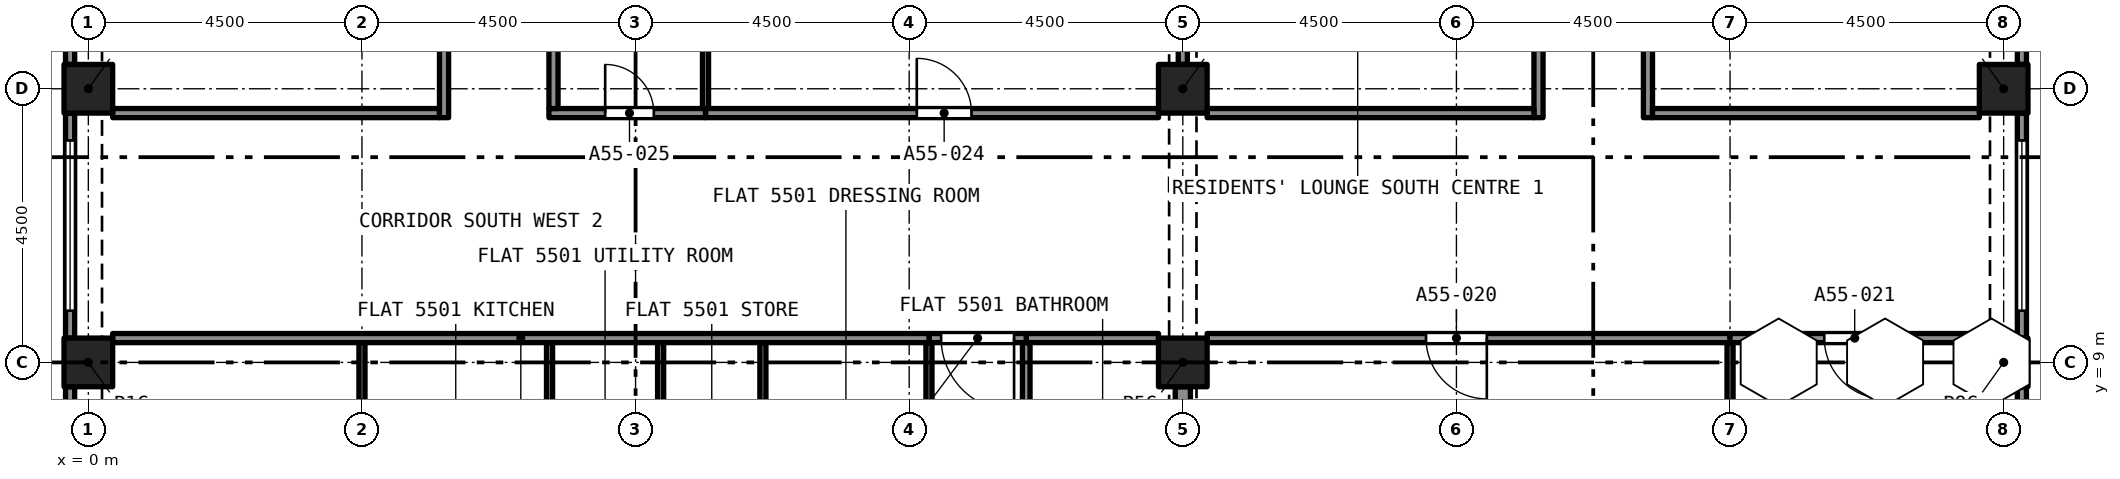
"""IFC4 building model, lengths in metres.
Left out: names, types, materials, properties, quantities, classifications, styles, units other than length and angle.
Written with IfcOpenShell. Run it as: python <this file> out.ifc"""

import sys

from ifc_helpers import new_model, si_unit, direction, frame, frame_2d, origin, origin_2d, place, context, subcontext, project, spatial, rectangle, extrude, element, fill, save


model = new_model("IFC4")
c1 = context("Model", 3, precision=1e-05, world=origin(), true_north=direction((0.0, 1.0)))
c2 = subcontext(c1, "Body", "Model", "MODEL_VIEW")
j1 = project(units=[si_unit("LENGTHUNIT", "METRE"), si_unit("PLANEANGLEUNIT", "RADIAN")], contexts=[c1])
p1 = place(None, origin())
s1 = spatial("IfcSite", under=j1, at=p1, CompositionType="ELEMENT")
p2 = place(p1, origin())
s2 = spatial("IfcBuilding", under=s1, at=p2, CompositionType="ELEMENT")
p3 = place(p2, frame((0.0, 0.0, 198.7)))
s3 = spatial("IfcBuildingStorey", under=s2, at=p3, CompositionType="ELEMENT", Elevation=198.7)
for number, where, z_axis, x_axis in (
    (1, (0.0, 9.0, 0.0), (0.0, 0.0, 1.0), (1.0, 0.0, 0.0)),
    (2, (18.0, 9.0, 0.0), (0.0, 0.0, 1.0), (1.0, 0.0, 0.0)),
    (3, (31.5, 9.0, 0.0), (0.0, 0.0, 1.0), (1.0, 0.0, 0.0)),
    (4, (0.0, 13.5, 0.0), (0.0, 0.0, 1.0), (1.0, 0.0, 0.0)),
    (5, (18.0, 13.5, 0.0), (0.0, 0.0, 1.0), (1.0, 0.0, 0.0)),
    (6, (31.5, 13.5, 0.0), (0.0, 0.0, 1.0), (1.0, 0.0, 0.0)),
):
    element("IfcColumn", number, at=place(p3, frame(where, z_axis=z_axis, x_axis=x_axis)), inside=s3, PredefinedType="COLUMN", context=c2, shape_type="SweptSolid", body=[
        extrude(rectangle(XDim=0.8, YDim=0.8, at=origin_2d()), origin(), (0.0, 0.0, 1.0), 3.2),
    ])
p4 = place(p3, frame((31.8, 8.6, 0.0), z_axis=(0.0, 0.0, 1.0), x_axis=(0.0, -1.0, 0.0)))
e7 = element("IfcWall", 7, at=p4, inside=s3, PredefinedType="SOLIDWALL", context=c2, shape_type="SweptSolid", body=[
    extrude(rectangle(XDim=3.7, YDim=0.15, at=frame_2d((1.85, 0.0))), origin(), (0.0, 0.0, 1.0), 3.2),
])
p5 = place(p4, frame((0.45, 0.0, 0.45)))
e8 = element("IfcOpeningElement", 8, at=p5, cuts=e7, PredefinedType="OPENING", context=c2, shape_type="SweptSolid", body=[
    extrude(rectangle(XDim=2.8, YDim=1.95, at=frame_2d((1.4, 0.975))), frame((0.0, 0.085, 0.0), z_axis=(0.0, -1.0, 0.0), x_axis=(1.0, 0.0, 0.0)), (0.0, 0.0, 1.0), 0.17),
])
p6 = place(p3, frame((31.8, 13.1, 0.0), z_axis=(0.0, 0.0, 1.0), x_axis=(0.0, -1.0, 0.0)))
e9 = element("IfcWall", 9, at=p6, inside=s3, PredefinedType="SOLIDWALL", context=c2, shape_type="SweptSolid", body=[
    extrude(rectangle(XDim=3.7, YDim=0.15, at=frame_2d((1.85, 0.0))), origin(), (0.0, 0.0, 1.0), 3.2),
])
p7 = place(p6, frame((0.45, 0.0, 0.45)))
e10 = element("IfcOpeningElement", 10, at=p7, cuts=e9, PredefinedType="OPENING", context=c2, shape_type="SweptSolid", body=[
    extrude(rectangle(XDim=2.8, YDim=1.95, at=frame_2d((1.4, 0.975))), frame((0.0, 0.085, 0.0), z_axis=(0.0, -1.0, 0.0), x_axis=(1.0, 0.0, 0.0)), (0.0, 0.0, 1.0), 0.17),
])
p8 = place(p3, frame((31.8, 17.6, 0.0), z_axis=(0.0, 0.0, 1.0), x_axis=(0.0, -1.0, 0.0)))
e11 = element("IfcWall", 11, at=p8, inside=s3, PredefinedType="SOLIDWALL", context=c2, shape_type="SweptSolid", body=[
    extrude(rectangle(XDim=3.7, YDim=0.15, at=frame_2d((1.85, 0.0))), origin(), (0.0, 0.0, 1.0), 3.2),
])
p9 = place(p8, frame((0.45, 0.0, 0.45)))
e12 = element("IfcOpeningElement", 12, at=p9, cuts=e11, PredefinedType="OPENING", context=c2, shape_type="SweptSolid", body=[
    extrude(rectangle(XDim=2.8, YDim=1.95, at=frame_2d((1.4, 0.975))), frame((0.0, 0.085, 0.0), z_axis=(0.0, -1.0, 0.0), x_axis=(1.0, 0.0, 0.0)), (0.0, 0.0, 1.0), 0.17),
])
p10 = place(p3, frame((-0.3, 13.9, 0.0), z_axis=(0.0, 0.0, 1.0), x_axis=(0.0, 1.0, 0.0)))
e13 = element("IfcWall", 13, at=p10, inside=s3, PredefinedType="SOLIDWALL", context=c2, shape_type="SweptSolid", body=[
    extrude(rectangle(XDim=3.7, YDim=0.15, at=frame_2d((1.85, 0.0))), origin(), (0.0, 0.0, 1.0), 3.2),
])
p11 = place(p10, frame((0.45, 0.0, 0.45)))
e14 = element("IfcOpeningElement", 14, at=p11, cuts=e13, PredefinedType="OPENING", context=c2, shape_type="SweptSolid", body=[
    extrude(rectangle(XDim=2.8, YDim=1.95, at=frame_2d((1.4, 0.975))), frame((0.0, 0.085, 0.0), z_axis=(0.0, -1.0, 0.0), x_axis=(1.0, 0.0, 0.0)), (0.0, 0.0, 1.0), 0.17),
])
p12 = place(p3, frame((-0.3, 9.4, 0.0), z_axis=(0.0, 0.0, 1.0), x_axis=(0.0, 1.0, 0.0)))
e15 = element("IfcWall", 15, at=p12, inside=s3, PredefinedType="SOLIDWALL", context=c2, shape_type="SweptSolid", body=[
    extrude(rectangle(XDim=3.7, YDim=0.15, at=frame_2d((1.85, 0.0))), origin(), (0.0, 0.0, 1.0), 3.2),
])
p13 = place(p12, frame((0.45, 0.0, 0.45)))
e16 = element("IfcOpeningElement", 16, at=p13, cuts=e15, PredefinedType="OPENING", context=c2, shape_type="SweptSolid", body=[
    extrude(rectangle(XDim=2.8, YDim=1.95, at=frame_2d((1.4, 0.975))), frame((0.0, 0.085, 0.0), z_axis=(0.0, -1.0, 0.0), x_axis=(1.0, 0.0, 0.0)), (0.0, 0.0, 1.0), 0.17),
])
p14 = place(p3, frame((-0.3, 4.9, 0.0), z_axis=(0.0, 0.0, 1.0), x_axis=(0.0, 1.0, 0.0)))
e17 = element("IfcWall", 17, at=p14, inside=s3, PredefinedType="SOLIDWALL", context=c2, shape_type="SweptSolid", body=[
    extrude(rectangle(XDim=3.7, YDim=0.15, at=frame_2d((1.85, 0.0))), origin(), (0.0, 0.0, 1.0), 3.2),
])
p15 = place(p14, frame((0.45, 0.0, 0.45)))
e18 = element("IfcOpeningElement", 18, at=p15, cuts=e17, PredefinedType="OPENING", context=c2, shape_type="SweptSolid", body=[
    extrude(rectangle(XDim=2.8, YDim=1.95, at=frame_2d((1.4, 0.975))), frame((0.0, 0.085, 0.0), z_axis=(0.0, -1.0, 0.0), x_axis=(1.0, 0.0, 0.0)), (0.0, 0.0, 1.0), 0.17),
])
p16 = place(p3, frame((15.425, 5.643, 0.0), z_axis=(0.0, 0.0, 1.0), x_axis=(0.0, 1.0, 0.0)))
e19 = element("IfcWall", 19, at=p16, inside=s3, PredefinedType="PARTITIONING", context=c2, shape_type="SweptSolid", body=[
    extrude(rectangle(XDim=3.682, YDim=0.125, at=frame_2d((1.841, 0.0))), origin(), (0.0, 0.0, 1.0), 2.7),
])
p17 = place(p3, frame((15.425, 9.4, 0.0), z_axis=(0.0, 0.0, 1.0), x_axis=(1.0, 0.0, 0.0)))
e20 = element("IfcWall", 20, at=p17, inside=s3, PredefinedType="PARTITIONING", context=c2, shape_type="SweptSolid", body=[
    extrude(rectangle(XDim=2.175, YDim=0.15, at=frame_2d((1.087, 0.0))), origin(), (0.0, 0.0, 1.0), 2.7),
])
for number, where, z_axis, x_axis in (
    (21, (13.825, 5.63, 0.0), (0.0, 0.0, 1.0), (0.0, 1.0, 0.0)),
    (22, (11.094, 5.63, 0.0), (0.0, 0.0, 1.0), (0.0, 1.0, 0.0)),
):
    element("IfcWall", number, at=place(p3, frame(where, z_axis=z_axis, x_axis=x_axis)), inside=s3, PredefinedType="PARTITIONING", context=c2, shape_type="SweptSolid", body=[
        extrude(rectangle(XDim=3.695, YDim=0.1, at=frame_2d((1.848, 0.0))), origin(), (0.0, 0.0, 1.0), 2.7),
    ])
p18 = place(p3, frame((18.0, 4.9, 0.0), z_axis=(0.0, 0.0, 1.0), x_axis=(0.0, 1.0, 0.0)))
e23 = element("IfcWall", 23, at=p18, inside=s3, PredefinedType="PARTITIONING", context=c2, shape_type="SweptSolid", body=[
    extrude(rectangle(XDim=3.7, YDim=0.25, at=frame_2d((1.85, 0.0))), origin(), (0.0, 0.0, 1.0), 2.38),
])
p19 = place(p3, frame((15.425, 9.4, 0.0), z_axis=(0.0, 0.0, 1.0), x_axis=(-1.0, 0.0, 0.0)))
e24 = element("IfcWall", 24, at=p19, inside=s3, PredefinedType="PARTITIONING", context=c2, shape_type="SweptSolid", body=[
    extrude(rectangle(XDim=1.6, YDim=0.15, at=frame_2d((0.8, 0.0))), origin(), (0.0, 0.0, 1.0), 2.7),
])
p20 = place(p19, frame((0.2, 0.0, 0.0)))
e25 = element("IfcOpeningElement", 25, at=p20, cuts=e24, PredefinedType="OPENING", context=c2, shape_type="SweptSolid", body=[
    extrude(rectangle(XDim=1.2, YDim=2.4, at=frame_2d((0.6, 1.2))), frame((0.0, 0.085, 0.0), z_axis=(0.0, -1.0, 0.0), x_axis=(1.0, 0.0, 0.0)), (0.0, 0.0, 1.0), 0.17),
])
p21 = place(p3, frame((4.5, 5.58, 0.0), z_axis=(0.0, 0.0, 1.0), x_axis=(0.0, 1.0, 0.0)))
e26 = element("IfcWall", 26, at=p21, inside=s3, PredefinedType="PARTITIONING", context=c2, shape_type="SweptSolid", body=[
    extrude(rectangle(XDim=3.745, YDim=0.1, at=frame_2d((1.873, 0.0))), origin(), (0.0, 0.0, 1.0), 2.7),
])
p22 = place(p3, frame((7.585, 5.63, 0.0), z_axis=(0.0, 0.0, 1.0), x_axis=(0.0, 1.0, 0.0)))
e27 = element("IfcWall", 27, at=p22, inside=s3, PredefinedType="PARTITIONING", context=c2, shape_type="SweptSolid", body=[
    extrude(rectangle(XDim=3.695, YDim=0.1, at=frame_2d((1.848, 0.0))), origin(), (0.0, 0.0, 1.0), 2.7),
])
p23 = place(p3, frame((0.4, 9.4, 0.0), z_axis=(0.0, 0.0, 1.0), x_axis=(1.0, 0.0, 0.0)))
e28 = element("IfcWall", 28, at=p23, inside=s3, PredefinedType="PARTITIONING", context=c2, shape_type="SweptSolid", body=[
    extrude(rectangle(XDim=13.425, YDim=0.15, at=frame_2d((6.712, 0.0))), origin(), (0.0, 0.0, 1.0), 2.7),
])
p24 = place(p3, frame((9.412, 5.63, 0.0), z_axis=(0.0, 0.0, 1.0), x_axis=(0.0, 1.0, 0.0)))
e29 = element("IfcWall", 29, at=p24, inside=s3, PredefinedType="PARTITIONING", context=c2, shape_type="SweptSolid", body=[
    extrude(rectangle(XDim=3.695, YDim=0.1, at=frame_2d((1.848, 0.0))), origin(), (0.0, 0.0, 1.0), 2.7),
])
p25 = place(p3, frame((27.0, 0.433, 0.0), z_axis=(0.0, 0.0, 1.0), x_axis=(0.0, 1.0, 0.0)))
e30 = element("IfcWall", 30, at=p25, inside=s3, PredefinedType="PARTITIONING", context=c2, shape_type="SweptSolid", body=[
    extrude(rectangle(XDim=8.892, YDim=0.1, at=frame_2d((4.446, 0.0))), origin(), (0.0, 0.0, 1.0), 2.7),
])
p26 = place(p3, frame((27.0, 9.4, 0.0), z_axis=(0.0, 0.0, 1.0), x_axis=(-1.0, 0.0, 0.0)))
e31 = element("IfcWall", 31, at=p26, inside=s3, PredefinedType="PARTITIONING", context=c2, shape_type="SweptSolid", body=[
    extrude(rectangle(XDim=8.6, YDim=0.15, at=frame_2d((4.3, 0.0))), origin(), (0.0, 0.0, 1.0), 2.7),
])
p27 = place(p26, frame((4.0, 0.0, 0.0)))
e32 = element("IfcOpeningElement", 32, at=p27, cuts=e31, PredefinedType="OPENING", context=c2, shape_type="SweptSolid", body=[
    extrude(rectangle(XDim=1.0, YDim=2.1, at=frame_2d((0.5, 1.05))), frame((0.0, 0.085, 0.0), z_axis=(0.0, -1.0, 0.0), x_axis=(1.0, 0.0, 0.0)), (0.0, 0.0, 1.0), 0.17),
])
p28 = place(p3, frame((31.1, 9.4, 0.0), z_axis=(0.0, 0.0, 1.0), x_axis=(-1.0, 0.0, 0.0)))
e33 = element("IfcWall", 33, at=p28, inside=s3, PredefinedType="PARTITIONING", context=c2, shape_type="SweptSolid", body=[
    extrude(rectangle(XDim=4.1, YDim=0.15, at=frame_2d((2.05, 0.0))), origin(), (0.0, 0.0, 1.0), 2.7),
])
p29 = place(p28, frame((1.55, 0.0, 0.0)))
e34 = element("IfcOpeningElement", 34, at=p29, cuts=e33, PredefinedType="OPENING", context=c2, shape_type="SweptSolid", body=[
    extrude(rectangle(XDim=1.0, YDim=2.1, at=frame_2d((0.5, 1.05))), frame((0.0, 0.085, 0.0), z_axis=(0.0, -1.0, 0.0), x_axis=(1.0, 0.0, 0.0)), (0.0, 0.0, 1.0), 0.17),
])
p30 = place(p3, frame((23.85, 13.025, 0.0), z_axis=(0.0, 0.0, 1.0), x_axis=(0.0, 1.0, 0.0)))
e35 = element("IfcWall", 35, at=p30, inside=s3, PredefinedType="PARTITIONING", context=c2, shape_type="SweptSolid", body=[
    extrude(rectangle(XDim=9.55, YDim=0.15, at=frame_2d((4.775, 0.0))), origin(), (0.0, 0.0, 1.0), 2.7),
])
p31 = place(p30, frame((4.275, 0.0, 0.0)))
e36 = element("IfcOpeningElement", 36, at=p31, cuts=e35, PredefinedType="OPENING", context=c2, shape_type="SweptSolid", body=[
    extrude(rectangle(XDim=1.0, YDim=2.1, at=frame_2d((0.5, 1.05))), frame((0.0, 0.085, 0.0), z_axis=(0.0, -1.0, 0.0), x_axis=(1.0, 0.0, 0.0)), (0.0, 0.0, 1.0), 0.17),
])
p32 = place(p3, frame((25.65, 22.575, 0.0), z_axis=(0.0, 0.0, 1.0), x_axis=(0.0, -1.0, 0.0)))
e37 = element("IfcWall", 37, at=p32, inside=s3, PredefinedType="PARTITIONING", context=c2, shape_type="SweptSolid", body=[
    extrude(rectangle(XDim=9.55, YDim=0.15, at=frame_2d((4.775, 0.0))), origin(), (0.0, 0.0, 1.0), 2.7),
])
p33 = place(p32, frame((4.275, 0.0, 0.0)))
e38 = element("IfcOpeningElement", 38, at=p33, cuts=e37, PredefinedType="OPENING", context=c2, shape_type="SweptSolid", body=[
    extrude(rectangle(XDim=1.0, YDim=2.1, at=frame_2d((0.5, 1.05))), frame((0.0, 0.085, 0.0), z_axis=(0.0, -1.0, 0.0), x_axis=(1.0, 0.0, 0.0)), (0.0, 0.0, 1.0), 0.17),
])
for number, where, z_axis, x_axis in (
    (39, (18.4, 13.1, 0.0), (0.0, 0.0, 1.0), (1.0, 0.0, 0.0)),
    (40, (25.725, 13.1, 0.0), (0.0, 0.0, 1.0), (1.0, 0.0, 0.0)),
):
    element("IfcWall", number, at=place(p3, frame(where, z_axis=z_axis, x_axis=x_axis)), inside=s3, PredefinedType="PARTITIONING", context=c2, shape_type="SweptSolid", body=[
        extrude(rectangle(XDim=5.375, YDim=0.15, at=frame_2d((2.688, 0.0))), origin(), (0.0, 0.0, 1.0), 2.7),
    ])
p34 = place(p3, frame((10.15, 13.1, 0.0), z_axis=(0.0, 0.0, 1.0), x_axis=(1.0, 0.0, 0.0)))
e41 = element("IfcWall", 41, at=p34, inside=s3, PredefinedType="PARTITIONING", context=c2, shape_type="SweptSolid", body=[
    extrude(rectangle(XDim=7.45, YDim=0.15, at=frame_2d((3.725, 0.0))), origin(), (0.0, 0.0, 1.0), 2.7),
])
p35 = place(p34, frame((3.475, 0.0, 0.0)))
e42 = element("IfcOpeningElement", 42, at=p35, cuts=e41, PredefinedType="OPENING", context=c2, shape_type="SweptSolid", body=[
    extrude(rectangle(XDim=0.9, YDim=2.1, at=frame_2d((0.45, 1.05))), frame((0.0, 0.085, 0.0), z_axis=(0.0, -1.0, 0.0), x_axis=(1.0, 0.0, 0.0)), (0.0, 0.0, 1.0), 0.17),
])
p36 = place(p3, frame((7.575, 13.1, 0.0), z_axis=(0.0, 0.0, 1.0), x_axis=(1.0, 0.0, 0.0)))
e43 = element("IfcWall", 43, at=p36, inside=s3, PredefinedType="PARTITIONING", context=c2, shape_type="SweptSolid", body=[
    extrude(rectangle(XDim=2.575, YDim=0.15, at=frame_2d((1.288, 0.0))), origin(), (0.0, 0.0, 1.0), 2.7),
])
p37 = place(p36, frame((0.925, 0.0, 0.0)))
e44 = element("IfcOpeningElement", 44, at=p37, cuts=e43, PredefinedType="OPENING", context=c2, shape_type="SweptSolid", body=[
    extrude(rectangle(XDim=0.8, YDim=2.1, at=frame_2d((0.4, 1.05))), frame((0.0, 0.085, 0.0), z_axis=(0.0, -1.0, 0.0), x_axis=(1.0, 0.0, 0.0)), (0.0, 0.0, 1.0), 0.17),
])
p38 = place(p3, frame((0.4, 13.1, 0.0), z_axis=(0.0, 0.0, 1.0), x_axis=(1.0, 0.0, 0.0)))
e45 = element("IfcWall", 45, at=p38, inside=s3, PredefinedType="PARTITIONING", context=c2, shape_type="SweptSolid", body=[
    extrude(rectangle(XDim=5.375, YDim=0.15, at=frame_2d((2.688, 0.0))), origin(), (0.0, 0.0, 1.0), 2.7),
])
p39 = place(p3, frame((18.0, 13.9, 0.0), z_axis=(0.0, 0.0, 1.0), x_axis=(0.0, 1.0, 0.0)))
e46 = element("IfcWall", 46, at=p39, inside=s3, PredefinedType="PARTITIONING", context=c2, shape_type="SweptSolid", body=[
    extrude(rectangle(XDim=1.8, YDim=0.15, at=frame_2d((0.9, 0.0))), origin(), (0.0, 0.0, 1.0), 2.38),
])
p40 = place(p3, frame((7.65, 13.175, 0.0), z_axis=(0.0, 0.0, 1.0), x_axis=(0.0, 1.0, 0.0)))
e47 = element("IfcWall", 47, at=p40, inside=s3, PredefinedType="PARTITIONING", context=c2, shape_type="SweptSolid", body=[
    extrude(rectangle(XDim=2.525, YDim=0.15, at=frame_2d((1.262, 0.0))), origin(), (0.0, 0.0, 1.0), 2.7),
])
p41 = place(p3, frame((5.85, 13.025, 0.0), z_axis=(0.0, 0.0, 1.0), x_axis=(0.0, 1.0, 0.0)))
e48 = element("IfcWall", 48, at=p41, inside=s3, PredefinedType="PARTITIONING", context=c2, shape_type="SweptSolid", body=[
    extrude(rectangle(XDim=9.475, YDim=0.15, at=frame_2d((4.738, 0.0))), origin(), (0.0, 0.0, 1.0), 2.7),
])
p42 = place(p41, frame((4.275, 0.0, 0.0)))
e49 = element("IfcOpeningElement", 49, at=p42, cuts=e48, PredefinedType="OPENING", context=c2, shape_type="SweptSolid", body=[
    extrude(rectangle(XDim=1.0, YDim=2.1, at=frame_2d((0.5, 1.05))), frame((0.0, 0.085, 0.0), z_axis=(0.0, -1.0, 0.0), x_axis=(1.0, 0.0, 0.0)), (0.0, 0.0, 1.0), 0.17),
])
p43 = place(p3, frame((10.15, 13.175, 0.0), z_axis=(0.0, 0.0, 1.0), x_axis=(0.0, 1.0, 0.0)))
e50 = element("IfcWall", 50, at=p43, inside=s3, PredefinedType="PARTITIONING", context=c2, shape_type="SweptSolid", body=[
    extrude(rectangle(XDim=2.45, YDim=0.1, at=frame_2d((1.225, 0.0))), origin(), (0.0, 0.0, 1.0), 2.7),
])
p44 = place(p7, origin())
e51 = element("IfcWindow", 51, at=p44, inside=s3, PartitioningType="SINGLE_PANEL", PredefinedType="WINDOW", context=c2, shape_type="SweptSolid", body=[
    extrude(rectangle(XDim=2.8, YDim=1.95, at=frame_2d((1.4, 0.975))), frame((0.0, 0.03, 0.0), z_axis=(0.0, -1.0, 0.0), x_axis=(1.0, 0.0, 0.0)), (0.0, 0.0, 1.0), 0.06),
])
fill(e10, e51)
p45 = place(p13, origin())
e52 = element("IfcWindow", 52, at=p45, inside=s3, PartitioningType="SINGLE_PANEL", PredefinedType="WINDOW", context=c2, shape_type="SweptSolid", body=[
    extrude(rectangle(XDim=2.8, YDim=1.95, at=frame_2d((1.4, 0.975))), frame((0.0, 0.03, 0.0), z_axis=(0.0, -1.0, 0.0), x_axis=(1.0, 0.0, 0.0)), (0.0, 0.0, 1.0), 0.06),
])
fill(e16, e52)
p46 = place(p20, origin())
e53 = element("IfcDoor", 53, at=p46, inside=s3, OperationType="SINGLE_SWING_LEFT", PredefinedType="DOOR", context=c2, shape_type="SweptSolid", body=[
    extrude(rectangle(XDim=1.2, YDim=2.4, at=frame_2d((0.6, 1.2))), frame((0.0, 0.025, 0.0), z_axis=(0.0, -1.0, 0.0), x_axis=(1.0, 0.0, 0.0)), (0.0, 0.0, 1.0), 0.05),
])
fill(e25, e53)
p47 = place(p27, origin())
e54 = element("IfcDoor", 54, at=p47, inside=s3, OperationType="SINGLE_SWING_RIGHT", PredefinedType="DOOR", context=c2, shape_type="SweptSolid", body=[
    extrude(rectangle(XDim=1.0, YDim=2.1, at=frame_2d((0.5, 1.05))), frame((0.0, 0.025, 0.0), z_axis=(0.0, -1.0, 0.0), x_axis=(1.0, 0.0, 0.0)), (0.0, 0.0, 1.0), 0.05),
])
fill(e32, e54)
p48 = place(p29, origin())
e55 = element("IfcDoor", 55, at=p48, inside=s3, OperationType="SINGLE_SWING_RIGHT", PredefinedType="DOOR", context=c2, shape_type="SweptSolid", body=[
    extrude(rectangle(XDim=1.0, YDim=2.1, at=frame_2d((0.5, 1.05))), frame((0.0, 0.025, 0.0), z_axis=(0.0, -1.0, 0.0), x_axis=(1.0, 0.0, 0.0)), (0.0, 0.0, 1.0), 0.05),
])
fill(e34, e55)
p49 = place(p35, origin())
e56 = element("IfcDoor", 56, at=p49, inside=s3, OperationType="SINGLE_SWING_RIGHT", PredefinedType="DOOR", context=c2, shape_type="SweptSolid", body=[
    extrude(rectangle(XDim=0.9, YDim=2.1, at=frame_2d((0.45, 1.05))), frame((0.0, 0.025, 0.0), z_axis=(0.0, -1.0, 0.0), x_axis=(1.0, 0.0, 0.0)), (0.0, 0.0, 1.0), 0.05),
])
fill(e42, e56)
p50 = place(p37, origin())
e57 = element("IfcDoor", 57, at=p50, inside=s3, OperationType="SINGLE_SWING_RIGHT", PredefinedType="DOOR", context=c2, shape_type="SweptSolid", body=[
    extrude(rectangle(XDim=0.8, YDim=2.1, at=frame_2d((0.4, 1.05))), frame((0.0, 0.025, 0.0), z_axis=(0.0, -1.0, 0.0), x_axis=(1.0, 0.0, 0.0)), (0.0, 0.0, 1.0), 0.05),
])
fill(e44, e57)
save(model, sys.argv[1])
